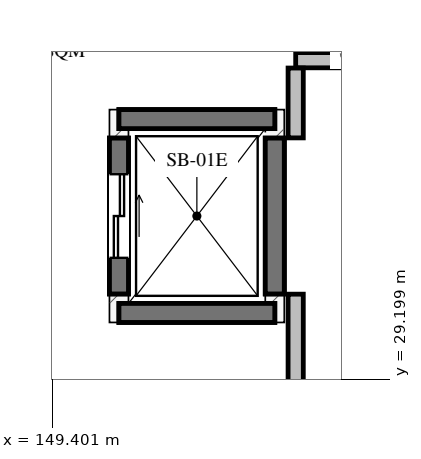
"""IFC4 building model, lengths in metres.
Left out: names, types, materials, properties, quantities, classifications, styles, units other than length and angle.
Written with IfcOpenShell. Run it as: python <this file> out.ifc"""

import sys

from ifc_helpers import new_model, si_unit, direction, frame, frame_2d, origin, place, context, subcontext, project, spatial, rectangle, extrude, element, fill, save


model = new_model("IFC4")
c1 = context("Model", 3, precision=1e-05, world=origin(), true_north=direction((0.0, 1.0)))
c2 = subcontext(c1, "Body", "Model", "MODEL_VIEW")
j1 = project(units=[si_unit("LENGTHUNIT", "METRE"), si_unit("PLANEANGLEUNIT", "RADIAN")], contexts=[c1])
p1 = place(None, origin())
s1 = spatial("IfcSite", under=j1, at=p1, CompositionType="ELEMENT")
p2 = place(p1, origin())
s2 = spatial("IfcBuilding", under=s1, at=p2, CompositionType="ELEMENT")
p3 = place(p2, frame((0.0, 0.0, 0.45)))
s3 = spatial("IfcBuildingStorey", under=s2, at=p3, CompositionType="ELEMENT", Elevation=0.45)
for number, where, z_axis, x_axis in (
    (1, (150.275, 30.075, -1.65), (0.0, 0.0, 1.0), (1.0, 0.0, 0.0)),
    (2, (150.275, 32.625, -1.65), (0.0, 0.0, 1.0), (1.0, 0.0, 0.0)),
    (3, (150.275, 30.325, -1.65), (0.0, 0.0, 1.0), (0.0, 1.0, 0.0)),
    (4, (152.325, 30.325, -1.65), (0.0, 0.0, 1.0), (0.0, 1.0, 0.0)),
):
    element("IfcWall", number, at=place(p3, frame(where, z_axis=z_axis, x_axis=x_axis)), inside=s3, PredefinedType="SHEAR", context=c2, shape_type="SweptSolid", body=[
        extrude(rectangle(XDim=2.05, YDim=0.25, at=frame_2d((1.025, 0.0))), origin(), (0.0, 0.0, 1.0), 1.65),
    ])
for number, where, z_axis, x_axis in (
    (5, (150.275, 30.075, 0.0), (0.0, 0.0, 1.0), (1.0, 0.0, 0.0)),
    (6, (150.275, 32.625, 0.0), (0.0, 0.0, 1.0), (1.0, 0.0, 0.0)),
):
    element("IfcWall", number, at=place(p3, frame(where, z_axis=z_axis, x_axis=x_axis)), inside=s3, PredefinedType="SHEAR", context=c2, shape_type="SweptSolid", body=[
        extrude(rectangle(XDim=2.05, YDim=0.25, at=frame_2d((1.025, 0.0))), origin(), (0.0, 0.0, 1.0), 5.2),
    ])
p4 = place(p3, frame((150.275, 30.325, 0.0), z_axis=(0.0, 0.0, 1.0), x_axis=(0.0, 1.0, 0.0)))
e7 = element("IfcWall", 7, at=p4, inside=s3, PredefinedType="SHEAR", context=c2, shape_type="SweptSolid", body=[
    extrude(rectangle(XDim=2.05, YDim=0.25, at=frame_2d((1.025, 0.0))), origin(), (0.0, 0.0, 1.0), 5.2),
])
p5 = place(p4, frame((0.475, 0.0, 0.0)))
e8 = element("IfcOpeningElement", 8, at=p5, cuts=e7, PredefinedType="OPENING", context=c2, shape_type="SweptSolid", body=[
    extrude(rectangle(XDim=1.1, YDim=2.15, at=frame_2d((0.55, 1.075))), frame((0.0, 0.135, 0.0), z_axis=(0.0, -1.0, 0.0), x_axis=(1.0, 0.0, 0.0)), (0.0, 0.0, 1.0), 0.27),
])
p6 = place(p3, frame((152.325, 30.325, 0.0), z_axis=(0.0, 0.0, 1.0), x_axis=(0.0, 1.0, 0.0)))
e9 = element("IfcWall", 9, at=p6, inside=s3, PredefinedType="SHEAR", context=c2, shape_type="SweptSolid", body=[
    extrude(rectangle(XDim=2.05, YDim=0.25, at=frame_2d((1.025, 0.0))), origin(), (0.0, 0.0, 1.0), 5.2),
])
p7 = place(p3, frame((152.6, 33.4, 0.0), z_axis=(0.0, 0.0, 1.0), x_axis=(1.0, 0.0, 0.0)))
e10 = element("IfcWall", 10, at=p7, inside=s3, PredefinedType="PARTITIONING", context=c2, shape_type="SweptSolid", body=[
    extrude(rectangle(XDim=8.287, YDim=0.2, at=frame_2d((4.144, 0.0))), origin(), (0.0, 0.0, 1.0), 5.2),
])
p8 = place(p7, frame((3.444, 0.0, 0.0)))
e11 = element("IfcOpeningElement", 11, at=p8, cuts=e10, PredefinedType="OPENING", context=c2, shape_type="SweptSolid", body=[
    extrude(rectangle(XDim=1.4, YDim=2.2, at=frame_2d((0.7, 1.1))), frame((0.0, 0.11, 0.0), z_axis=(0.0, -1.0, 0.0), x_axis=(1.0, 0.0, 0.0)), (0.0, 0.0, 1.0), 0.22),
])
p9 = place(p3, frame((152.6, 26.178, 0.0), z_axis=(0.0, 0.0, 1.0), x_axis=(0.0, 1.0, 0.0)))
e12 = element("IfcWall", 12, at=p9, inside=s3, PredefinedType="PARTITIONING", context=c2, shape_type="SweptSolid", body=[
    extrude(rectangle(XDim=4.144, YDim=0.2, at=frame_2d((2.072, 0.0))), origin(), (0.0, 0.0, 1.0), 5.2),
])
p10 = place(p3, frame((152.6, 32.378, 0.0), z_axis=(0.0, 0.0, 1.0), x_axis=(0.0, 1.0, 0.0)))
e13 = element("IfcWall", 13, at=p10, inside=s3, PredefinedType="PARTITIONING", context=c2, shape_type="SweptSolid", body=[
    extrude(rectangle(XDim=0.919, YDim=0.2, at=frame_2d((0.459, 0.0))), origin(), (0.0, 0.0, 1.0), 5.2),
])
p11 = place(p5, origin())
e14 = element("IfcDoor", 14, at=p11, inside=s3, OperationType="DOUBLE_DOOR_SLIDING", PredefinedType="DOOR", context=c2, shape_type="SweptSolid", body=[
    extrude(rectangle(XDim=1.1, YDim=2.15, at=frame_2d((0.55, 1.075))), frame((0.0, 0.025, 0.0), z_axis=(0.0, -1.0, 0.0), x_axis=(1.0, 0.0, 0.0)), (0.0, 0.0, 1.0), 0.05),
])
fill(e8, e14)
save(model, sys.argv[1])
